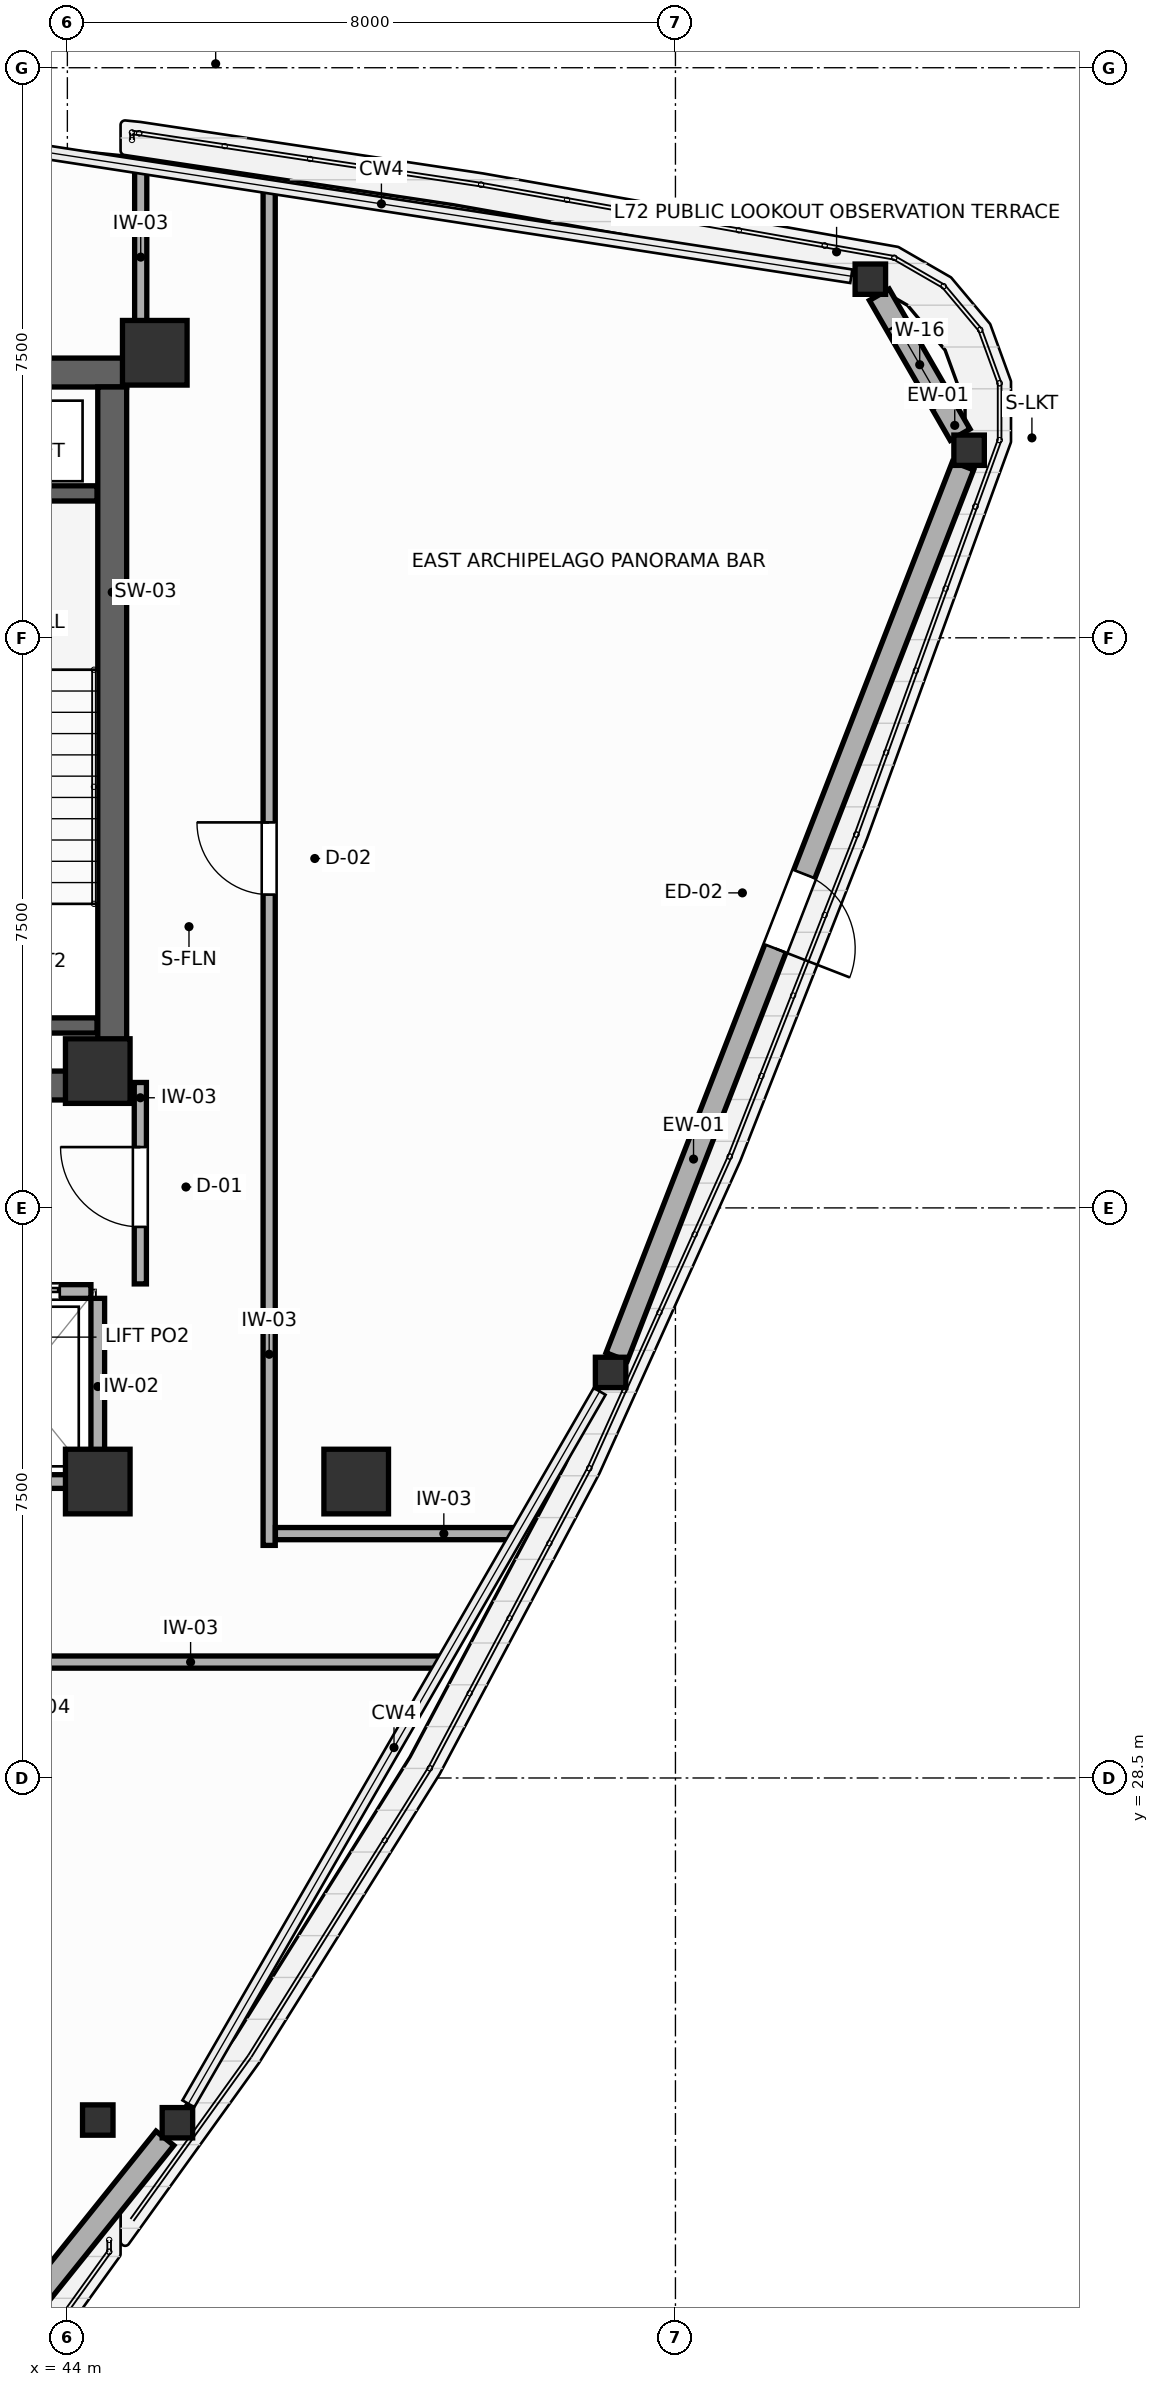
"""IFC4 building model, lengths in metres.
Left out: names, types, materials, properties, quantities, classifications, styles, units other than length and angle.
Written with IfcOpenShell. Run it as: python <this file> out.ifc"""

import sys

from ifc_helpers import new_model, si_unit, direction, frame, frame_2d, origin, origin_2d, place, context, subcontext, project, spatial, rectangle, i_section, extrude, source, transform, mapped, element, fill, save


model = new_model("IFC4")
c1 = context("Model", 3, precision=1e-05, world=origin(), true_north=direction((0.0, 1.0)))
c2 = subcontext(c1, "Body", "Model", "MODEL_VIEW")
j1 = project(units=[si_unit("LENGTHUNIT", "METRE"), si_unit("PLANEANGLEUNIT", "RADIAN")], contexts=[c1])
p1 = place(None, origin())
s1 = spatial("IfcSite", under=j1, at=p1, CompositionType="ELEMENT")
p2 = place(p1, origin())
s2 = spatial("IfcBuilding", under=s1, at=p2, CompositionType="ELEMENT")
p3 = place(p2, frame((0.0, 0.0, 275.4)))
s3 = spatial("IfcBuildingStorey", under=s2, at=p3, CompositionType="ELEMENT", Elevation=275.4)
p4 = place(p3, frame((27.22, 46.99, 0.0), z_axis=(0.0, 0.0, 1.0), x_axis=(1.0, 0.0, 0.0)))
e1 = element("IfcWall", 1, at=p4, inside=s3, PredefinedType="SHEAR", context=c2, shape_type="SweptSolid", body=[
    extrude(rectangle(XDim=17.56, YDim=0.38, at=frame_2d((8.78, 0.0))), origin(), (0.0, 0.0, 1.0), 4.2),
])
p5 = place(p3, frame((27.22, 37.61, 0.0), z_axis=(0.0, 0.0, 1.0), x_axis=(1.0, 0.0, 0.0)))
e2 = element("IfcWall", 2, at=p5, inside=s3, PredefinedType="SHEAR", context=c2, shape_type="SweptSolid", body=[
    extrude(rectangle(XDim=17.56, YDim=0.38, at=frame_2d((8.78, 0.0))), origin(), (0.0, 0.0, 1.0), 4.2),
])
p6 = place(p5, frame((4.805, 0.0, 0.0)))
e3 = element("IfcOpeningElement", 3, at=p6, cuts=e2, PredefinedType="OPENING", context=c2, shape_type="SweptSolid", body=[
    extrude(rectangle(XDim=1.05, YDim=2.1, at=frame_2d((0.525, 1.05))), frame((0.0, 0.2, 0.0), z_axis=(0.0, -1.0, 0.0), x_axis=(1.0, 0.0, 0.0)), (0.0, 0.0, 1.0), 0.4),
])
p7 = place(p5, frame((11.705, 0.0, 0.0)))
e4 = element("IfcOpeningElement", 4, at=p7, cuts=e2, PredefinedType="OPENING", context=c2, shape_type="SweptSolid", body=[
    extrude(rectangle(XDim=1.05, YDim=2.1, at=frame_2d((0.525, 1.05))), frame((0.0, 0.2, 0.0), z_axis=(0.0, -1.0, 0.0), x_axis=(1.0, 0.0, 0.0)), (0.0, 0.0, 1.0), 0.4),
])
p8 = place(p3, frame((44.59, 37.8, 0.0), z_axis=(0.0, 0.0, 1.0), x_axis=(0.0, 1.0, 0.0)))
e5 = element("IfcWall", 5, at=p8, inside=s3, PredefinedType="SHEAR", context=c2, shape_type="SweptSolid", body=[
    extrude(rectangle(XDim=9.0, YDim=0.38, at=frame_2d((4.5, 0.0))), origin(), (0.0, 0.0, 1.0), 4.2),
])
m1 = source(origin(), c2, "Body", "SweptSolid", [
    extrude(rectangle(XDim=0.85, YDim=0.85, at=origin_2d()), origin(), (0.0, 0.0, 1.0), 4.2),
])
for number, where, z_axis, x_axis in (
    (6, (45.15, 47.25, 0.0), (0.0, 0.0, 1.0), (1.0, 0.0, 0.0)),
    (7, (44.4, 37.8, 0.0), (0.0, 0.0, 1.0), (1.0, 0.0, 0.0)),
    (8, (44.4, 32.4, 0.0), (0.0, 0.0, 1.0), (1.0, 0.0, 0.0)),
    (9, (47.8, 32.4, 0.0), (0.0, 0.0, 1.0), (1.0, 0.0, 0.0)),
):
    element("IfcColumn", number, at=place(p3, frame(where, z_axis=z_axis, x_axis=x_axis)), inside=s3, PredefinedType="COLUMN", context=c2, shape_type="MappedRepresentation", body=[
        mapped(m1, transform((0.0, 0.0, 0.0), scale=1.0)),
    ])
m2 = source(origin(), c2, "Body", "SweptSolid", [
    extrude(i_section(OverallWidth=0.401, OverallDepth=0.399, WebThickness=0.022, FlangeThickness=0.036, FilletRadius=0.015, at=origin_2d()), origin(), (0.0, 0.0, 1.0), 4.2),
])
for number, where, z_axis, x_axis in (
    (10, (44.4, 24.0, 0.0), (0.0, 0.0, 1.0), (1.0, 0.0, 0.0)),
    (11, (55.863, 45.968, 0.0), (0.0, 0.0, 1.0), (1.0, 0.0, 0.0)),
    (12, (54.564, 48.218, 0.0), (0.0, 0.0, 1.0), (1.0, 0.0, 0.0)),
    (13, (45.448, 23.965, 0.0), (0.0, 0.0, 1.0), (1.0, 0.0, 0.0)),
    (14, (51.147, 33.836, 0.0), (0.0, 0.0, 1.0), (1.0, 0.0, 0.0)),
):
    element("IfcColumn", number, at=place(p3, frame(where, z_axis=z_axis, x_axis=x_axis)), inside=s3, PredefinedType="COLUMN", context=c2, shape_type="MappedRepresentation", body=[
        mapped(m2, transform((0.0, 0.0, 0.0), scale=1.0)),
    ])
p9 = place(p3, frame((55.745, 46.172, 0.0), z_axis=(0.0, 0.0, 1.0), x_axis=(-0.499967640965, 0.866044085476, 0.0)))
e15 = element("IfcWall", 15, at=p9, inside=s3, PredefinedType="SOLIDWALL", context=c2, shape_type="SweptSolid", body=[
    extrude(rectangle(XDim=2.126, YDim=0.3, at=frame_2d((1.063, 0.0))), origin(), (0.0, 0.0, 1.0), 2.52),
])
p10 = place(p9, frame((0.463, 0.0, 0.75)))
e16 = element("IfcOpeningElement", 16, at=p10, cuts=e15, PredefinedType="OPENING", context=c2, shape_type="SweptSolid", body=[
    extrude(rectangle(XDim=1.2, YDim=1.55, at=frame_2d((0.6, 0.775))), frame((0.0, 0.16, 0.0), z_axis=(0.0, -1.0, 0.0), x_axis=(1.0, 0.0, 0.0)), (0.0, 0.0, 1.0), 0.32),
])
p11 = place(p3, frame((37.463, 14.018, 0.0), z_axis=(0.0, 0.0, 1.0), x_axis=(0.626009756129, 0.779815225058, 0.0)))
e17 = element("IfcWall", 17, at=p11, inside=s3, PredefinedType="SOLIDWALL", context=c2, shape_type="SweptSolid", body=[
    extrude(rectangle(XDim=12.492, YDim=0.3, at=frame_2d((6.246, 0.0))), origin(), (0.0, 0.0, 1.0), 2.52),
])
p12 = place(p11, frame((5.721, 0.0, 0.0)))
e18 = element("IfcOpeningElement", 18, at=p12, cuts=e17, PredefinedType="OPENING", context=c2, shape_type="SweptSolid", body=[
    extrude(rectangle(XDim=1.05, YDim=2.1, at=frame_2d((0.525, 1.05))), frame((0.0, 0.16, 0.0), z_axis=(0.0, -1.0, 0.0), x_axis=(1.0, 0.0, 0.0)), (0.0, 0.0, 1.0), 0.32),
])
p13 = place(p3, frame((51.226, 34.04, 0.0), z_axis=(0.0, 0.0, 1.0), x_axis=(0.362340410402, 0.932045828803, 0.0)))
e19 = element("IfcWall", 19, at=p13, inside=s3, PredefinedType="SOLIDWALL", context=c2, shape_type="SweptSolid", body=[
    extrude(rectangle(XDim=12.578, YDim=0.3, at=frame_2d((6.289, 0.0))), origin(), (0.0, 0.0, 1.0), 2.52),
])
p14 = place(p13, frame((5.764, 0.0, 0.0)))
e20 = element("IfcOpeningElement", 20, at=p14, cuts=e19, PredefinedType="OPENING", context=c2, shape_type="SweptSolid", body=[
    extrude(rectangle(XDim=1.05, YDim=2.1, at=frame_2d((0.525, 1.05))), frame((0.0, 0.16, 0.0), z_axis=(0.0, -1.0, 0.0), x_axis=(1.0, 0.0, 0.0)), (0.0, 0.0, 1.0), 0.32),
])
for number, where, z_axis, x_axis in (
    (21, (41.25, 45.4, 0.0), (0.0, 0.0, 1.0), (1.0, 0.0, 0.0)),
    (22, (41.25, 38.4, 0.0), (0.0, 0.0, 1.0), (1.0, 0.0, 0.0)),
):
    element("IfcWall", number, at=place(p3, frame(where, z_axis=z_axis, x_axis=x_axis)), inside=s3, PredefinedType="SHEAR", context=c2, shape_type="SweptSolid", body=[
        extrude(rectangle(XDim=3.14, YDim=0.2, at=frame_2d((1.57, 0.0))), origin(), (0.0, 0.0, 1.0), 4.2),
    ])
p15 = place(p3, frame((42.39, 34.9, 0.0), z_axis=(0.0, 0.0, 1.0), x_axis=(1.0, 0.0, 0.0)))
e23 = element("IfcWall", 23, at=p15, inside=s3, PredefinedType="PARTITIONING", context=c2, shape_type="SweptSolid", body=[
    extrude(rectangle(XDim=1.92, YDim=0.18, at=frame_2d((0.96, 0.0))), origin(), (0.0, 0.0, 1.0), 3.96),
])
p16 = place(p15, frame((0.41, 0.0, 0.0)))
e24 = element("IfcOpeningElement", 24, at=p16, cuts=e23, PredefinedType="OPENING", context=c2, shape_type="SweptSolid", body=[
    extrude(rectangle(XDim=1.1, YDim=2.1, at=frame_2d((0.55, 1.05))), frame((0.0, 0.1, 0.0), z_axis=(0.0, -1.0, 0.0), x_axis=(1.0, 0.0, 0.0)), (0.0, 0.0, 1.0), 0.2),
])
p17 = place(p3, frame((42.39, 32.4, 0.0), z_axis=(0.0, 0.0, 1.0), x_axis=(1.0, 0.0, 0.0)))
e25 = element("IfcWall", 25, at=p17, inside=s3, PredefinedType="PARTITIONING", context=c2, shape_type="SweptSolid", body=[
    extrude(rectangle(XDim=1.92, YDim=0.18, at=frame_2d((0.96, 0.0))), origin(), (0.0, 0.0, 1.0), 2.52),
])
p18 = place(p3, frame((44.4, 32.49, 0.0), z_axis=(0.0, 0.0, 1.0), x_axis=(0.0, 1.0, 0.0)))
e26 = element("IfcWall", 26, at=p18, inside=s3, PredefinedType="PARTITIONING", context=c2, shape_type="SweptSolid", body=[
    extrude(rectangle(XDim=2.32, YDim=0.18, at=frame_2d((1.16, 0.0))), origin(), (0.0, 0.0, 1.0), 3.96),
])
p19 = place(p3, frame((44.96, 35.0, 0.0), z_axis=(0.0, 0.0, 1.0), x_axis=(0.0, 1.0, 0.0)))
e27 = element("IfcWall", 27, at=p19, inside=s3, PredefinedType="PARTITIONING", context=c2, shape_type="SweptSolid", body=[
    extrude(rectangle(XDim=2.65, YDim=0.16, at=frame_2d((1.325, 0.0))), origin(), (0.0, 0.0, 1.0), 3.96),
])
p20 = place(p19, frame((0.75, 0.0, 0.0)))
e28 = element("IfcOpeningElement", 28, at=p20, cuts=e27, PredefinedType="OPENING", context=c2, shape_type="SweptSolid", body=[
    extrude(rectangle(XDim=1.05, YDim=2.1, at=frame_2d((0.525, 1.05))), frame((0.0, 0.09, 0.0), z_axis=(0.0, -1.0, 0.0), x_axis=(1.0, 0.0, 0.0)), (0.0, 0.0, 1.0), 0.18),
])
p21 = place(p3, frame((46.655, 31.56, 0.0), z_axis=(0.0, 0.0, 1.0), x_axis=(0.0, 1.0, 0.0)))
e29 = element("IfcWall", 29, at=p21, inside=s3, PredefinedType="PARTITIONING", context=c2, shape_type="SweptSolid", body=[
    extrude(rectangle(XDim=17.856, YDim=0.16, at=frame_2d((8.928, 0.0))), origin(), (0.0, 0.0, 1.0), 3.96),
])
p22 = place(p21, frame((8.562, 0.0, 0.0)))
e30 = element("IfcOpeningElement", 30, at=p22, cuts=e29, PredefinedType="OPENING", context=c2, shape_type="SweptSolid", body=[
    extrude(rectangle(XDim=0.95, YDim=2.05, at=frame_2d((0.475, 1.025))), frame((0.0, 0.09, 0.0), z_axis=(0.0, -1.0, 0.0), x_axis=(1.0, 0.0, 0.0)), (0.0, 0.0, 1.0), 0.18),
])
p23 = place(p3, frame((35.19, 30.025, 0.0), z_axis=(0.0, 0.0, 1.0), x_axis=(1.0, 0.0, 0.0)))
e31 = element("IfcWall", 31, at=p23, inside=s3, PredefinedType="PARTITIONING", context=c2, shape_type="SweptSolid", body=[
    extrude(rectangle(XDim=13.737, YDim=0.16, at=frame_2d((6.868, 0.0))), origin(), (0.0, 0.0, 1.0), 3.96),
])
p24 = place(p23, frame((5.996, 0.0, 0.0)))
e32 = element("IfcOpeningElement", 32, at=p24, cuts=e31, PredefinedType="OPENING", context=c2, shape_type="SweptSolid", body=[
    extrude(rectangle(XDim=0.95, YDim=2.05, at=frame_2d((0.475, 1.025))), frame((0.0, 0.09, 0.0), z_axis=(0.0, -1.0, 0.0), x_axis=(1.0, 0.0, 0.0)), (0.0, 0.0, 1.0), 0.18),
])
p25 = place(p3, frame((46.737, 31.715, 0.0), z_axis=(0.0, 0.0, 1.0), x_axis=(1.0, 0.0, 0.0)))
e33 = element("IfcWall", 33, at=p25, inside=s3, PredefinedType="PARTITIONING", context=c2, shape_type="SweptSolid", body=[
    extrude(rectangle(XDim=3.166, YDim=0.16, at=frame_2d((1.583, 0.0))), origin(), (0.0, 0.0, 1.0), 3.96),
])
p26 = place(p3, frame((44.965, 47.34, 0.0), z_axis=(0.0, 0.0, 1.0), x_axis=(0.0, 1.0, 0.0)))
e34 = element("IfcWall", 34, at=p26, inside=s3, PredefinedType="PARTITIONING", context=c2, shape_type="SweptSolid", body=[
    extrude(rectangle(XDim=2.337, YDim=0.16, at=frame_2d((1.168, 0.0))), origin(), (0.0, 0.0, 1.0), 3.96),
])
p27 = place(p10, origin())
e35 = element("IfcWindow", 35, at=p27, inside=s3, PartitioningType="SINGLE_PANEL", PredefinedType="WINDOW", context=c2, shape_type="SweptSolid", body=[
    extrude(rectangle(XDim=1.2, YDim=1.55, at=frame_2d((0.6, 0.775))), frame((0.0, 0.03, 0.0), z_axis=(0.0, -1.0, 0.0), x_axis=(1.0, 0.0, 0.0)), (0.0, 0.0, 1.0), 0.06),
])
fill(e16, e35)
p28 = place(p14, frame((1.05, 0.0, 0.0), z_axis=(0.0, 0.0, 1.0), x_axis=(-1.0, 0.0, 0.0)))
e36 = element("IfcDoor", 36, at=p28, inside=s3, OperationType="SINGLE_SWING_RIGHT", PredefinedType="DOOR", context=c2, shape_type="SweptSolid", body=[
    extrude(rectangle(XDim=1.05, YDim=2.1, at=frame_2d((0.525, 1.05))), frame((0.0, 0.025, 0.0), z_axis=(0.0, -1.0, 0.0), x_axis=(1.0, 0.0, 0.0)), (0.0, 0.0, 1.0), 0.05),
])
fill(e20, e36)
p29 = place(p16, origin())
e37 = element("IfcDoor", 37, at=p29, inside=s3, OperationType="DOUBLE_DOOR_SLIDING", PredefinedType="DOOR", context=c2, shape_type="SweptSolid", body=[
    extrude(rectangle(XDim=1.1, YDim=2.1, at=frame_2d((0.55, 1.05))), frame((0.0, 0.025, 0.0), z_axis=(0.0, -1.0, 0.0), x_axis=(1.0, 0.0, 0.0)), (0.0, 0.0, 1.0), 0.05),
])
fill(e24, e37)
p30 = place(p20, origin())
e38 = element("IfcDoor", 38, at=p30, inside=s3, OperationType="SINGLE_SWING_RIGHT", PredefinedType="DOOR", context=c2, shape_type="SweptSolid", body=[
    extrude(rectangle(XDim=1.05, YDim=2.1, at=frame_2d((0.525, 1.05))), frame((0.0, 0.025, 0.0), z_axis=(0.0, -1.0, 0.0), x_axis=(1.0, 0.0, 0.0)), (0.0, 0.0, 1.0), 0.05),
])
fill(e28, e38)
p31 = place(p22, origin())
e39 = element("IfcDoor", 39, at=p31, inside=s3, OperationType="SINGLE_SWING_RIGHT", PredefinedType="DOOR", context=c2, shape_type="SweptSolid", body=[
    extrude(rectangle(XDim=0.95, YDim=2.05, at=frame_2d((0.475, 1.025))), frame((0.0, 0.025, 0.0), z_axis=(0.0, -1.0, 0.0), x_axis=(1.0, 0.0, 0.0)), (0.0, 0.0, 1.0), 0.05),
])
fill(e30, e39)
save(model, sys.argv[1])
